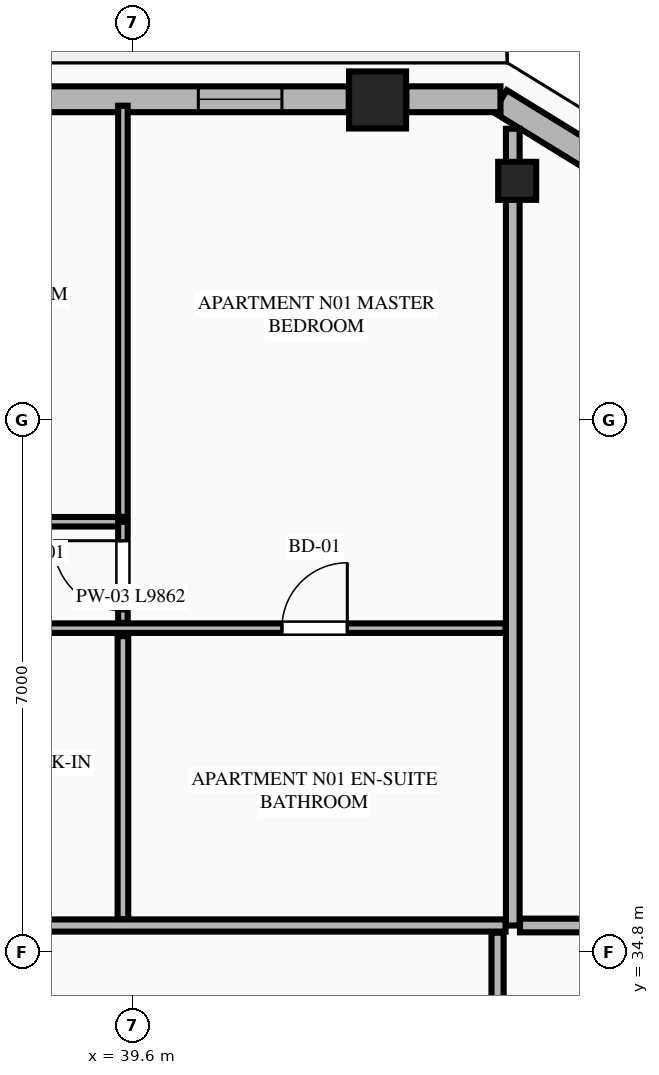
"""IFC4 building model, lengths in metres.
Left out: names, types, materials, properties, quantities, classifications, styles, units other than length and angle.
Written with IfcOpenShell. Run it as: python <this file> out.ifc"""

import sys

from ifc_helpers import new_model, si_unit, direction, frame, frame_2d, origin, origin_2d, place, context, subcontext, project, spatial, rectangle, extrude, element, fill, save


model = new_model("IFC4")
c1 = context("Model", 3, precision=1e-05, world=origin(), true_north=direction((0.0, 1.0)))
c2 = subcontext(c1, "Body", "Model", "MODEL_VIEW")
j1 = project(units=[si_unit("LENGTHUNIT", "METRE"), si_unit("PLANEANGLEUNIT", "RADIAN")], contexts=[c1])
p1 = place(None, origin())
s1 = spatial("IfcSite", under=j1, at=p1, CompositionType="ELEMENT")
p2 = place(p1, origin())
s2 = spatial("IfcBuilding", under=s1, at=p2, CompositionType="ELEMENT")
p3 = place(p2, frame((0.0, 0.0, 207.4)))
s3 = spatial("IfcBuildingStorey", under=s2, at=p3, CompositionType="ELEMENT", Elevation=207.4)
p4 = place(p3, frame((42.821, 46.011, 0.0), z_axis=(0.0, 0.0, 1.0), x_axis=(1.0, 0.0, 0.0)))
e1 = element("IfcColumn", 1, at=p4, inside=s3, PredefinedType="COLUMN", context=c2, shape_type="SweptSolid", body=[
    extrude(rectangle(XDim=0.75, YDim=0.75, at=origin_2d()), origin(), (0.0, 0.0, 1.0), 3.55),
])
p5 = place(p3, frame((44.658, 44.947, 0.0), z_axis=(0.0, 0.0, 1.0), x_axis=(-0.865230187018, 0.501374833306, 0.0)))
e2 = element("IfcColumn", 2, at=p5, inside=s3, PredefinedType="PILASTER", context=c2, shape_type="SweptSolid", body=[
    extrude(rectangle(XDim=0.5, YDim=0.35, at=origin_2d()), origin(), (0.0, 0.0, 1.0), 3.55),
])
p6 = place(p3, frame((45.862, 45.116, 0.0), z_axis=(0.0, 0.0, 1.0), x_axis=(-0.851713271379, 0.524008113828, 0.0)))
e3 = element("IfcWall", 3, at=p6, inside=s3, PredefinedType="STANDARD", context=c2, shape_type="SweptSolid", body=[
    extrude(rectangle(XDim=1.678, YDim=0.34, at=frame_2d((0.839, 0.0))), origin(), (0.0, 0.0, 1.0), 3.35),
])
p7 = place(p3, frame((44.438, 46.02, 0.0), z_axis=(0.0, 0.0, 1.0), x_axis=(-1.0, 0.0, 0.0)))
e4 = element("IfcWall", 4, at=p7, inside=s3, PredefinedType="STANDARD", context=c2, shape_type="SweptSolid", body=[
    extrude(rectangle(XDim=1.238, YDim=0.34, at=frame_2d((0.619, 0.0))), origin(), (0.0, 0.0, 1.0), 3.35),
])
p8 = place(p3, frame((42.442, 46.02, 0.0), z_axis=(0.0, 0.0, 1.0), x_axis=(-1.0, 0.0, 0.0)))
e5 = element("IfcWall", 5, at=p8, inside=s3, PredefinedType="STANDARD", context=c2, shape_type="SweptSolid", body=[
    extrude(rectangle(XDim=6.12, YDim=0.34, at=frame_2d((3.06, 0.0))), origin(), (0.0, 0.0, 1.0), 2.883),
])
p9 = place(p8, frame((0.879, 0.0, 0.75)))
e6 = element("IfcOpeningElement", 6, at=p9, cuts=e5, PredefinedType="OPENING", context=c2, shape_type="SweptSolid", body=[
    extrude(rectangle(XDim=1.1, YDim=1.983, at=frame_2d((0.55, 0.991))), frame((0.0, 0.18, 0.0), z_axis=(0.0, -1.0, 0.0), x_axis=(1.0, 0.0, 0.0)), (0.0, 0.0, 1.0), 0.36),
])
p10 = place(p8, frame((4.052, 0.0, 0.75)))
e7 = element("IfcOpeningElement", 7, at=p10, cuts=e5, PredefinedType="OPENING", context=c2, shape_type="SweptSolid", body=[
    extrude(rectangle(XDim=1.1, YDim=1.983, at=frame_2d((0.55, 0.991))), frame((0.0, 0.18, 0.0), z_axis=(0.0, -1.0, 0.0), x_axis=(1.0, 0.0, 0.0)), (0.0, 0.0, 1.0), 0.36),
])
p11 = place(p3, frame((44.6, 35.15, 0.0), z_axis=(0.0, 0.0, 1.0), x_axis=(0.0, 1.0, 0.0)))
e8 = element("IfcWall", 8, at=p11, inside=s3, PredefinedType="PARTITIONING", context=c2, shape_type="SweptSolid", body=[
    extrude(rectangle(XDim=10.482, YDim=0.18, at=frame_2d((5.241, 0.0))), origin(), (0.0, 0.0, 1.0), 3.35),
])
p12 = place(p3, frame((20.295, 35.15, 0.0), z_axis=(0.0, 0.0, 1.0), x_axis=(1.0, 0.0, 0.0)))
e9 = element("IfcWall", 9, at=p12, inside=s3, PredefinedType="PARTITIONING", context=c2, shape_type="SweptSolid", body=[
    extrude(rectangle(XDim=24.21, YDim=0.16, at=frame_2d((12.105, 0.0))), origin(), (0.0, 0.0, 1.0), 3.35),
])
p13 = place(p12, frame((0.405, 0.0, 0.0)))
e10 = element("IfcOpeningElement", 10, at=p13, cuts=e9, PredefinedType="OPENING", context=c2, shape_type="SweptSolid", body=[
    extrude(rectangle(XDim=1.35, YDim=2.35, at=frame_2d((0.675, 1.175))), frame((0.0, 0.09, 0.0), z_axis=(0.0, -1.0, 0.0), x_axis=(1.0, 0.0, 0.0)), (0.0, 0.0, 1.0), 0.18),
])
p14 = place(p3, frame((34.643, 39.062, 0.0), z_axis=(0.0, 0.0, 1.0), x_axis=(1.0, 0.0, 0.0)))
e11 = element("IfcWall", 11, at=p14, inside=s3, PredefinedType="PARTITIONING", context=c2, shape_type="SweptSolid", body=[
    extrude(rectangle(XDim=9.862, YDim=0.125, at=frame_2d((4.931, 0.0))), origin(), (0.0, 0.0, 1.0), 3.35),
])
p15 = place(p14, frame((6.92, 0.0, 0.0)))
e12 = element("IfcOpeningElement", 12, at=p15, cuts=e11, PredefinedType="OPENING", context=c2, shape_type="SweptSolid", body=[
    extrude(rectangle(XDim=0.86, YDim=2.1, at=frame_2d((0.43, 1.05))), frame((0.0, 0.073, 0.0), z_axis=(0.0, -1.0, 0.0), x_axis=(1.0, 0.0, 0.0)), (0.0, 0.0, 1.0), 0.145),
])
p16 = place(p14, frame((0.3, 0.0, 0.0)))
e13 = element("IfcOpeningElement", 13, at=p16, cuts=e11, PredefinedType="OPENING", context=c2, shape_type="SweptSolid", body=[
    extrude(rectangle(XDim=0.88, YDim=2.15, at=frame_2d((0.44, 1.075))), frame((0.0, 0.073, 0.0), z_axis=(0.0, -1.0, 0.0), x_axis=(1.0, 0.0, 0.0)), (0.0, 0.0, 1.0), 0.145),
])
p17 = place(p3, frame((29.514, 40.462, 0.0), z_axis=(0.0, 0.0, 1.0), x_axis=(1.0, 0.0, 0.0)))
e14 = element("IfcWall", 14, at=p17, inside=s3, PredefinedType="PARTITIONING", context=c2, shape_type="SweptSolid", body=[
    extrude(rectangle(XDim=9.957, YDim=0.125, at=frame_2d((4.979, 0.0))), origin(), (0.0, 0.0, 1.0), 3.35),
])
p18 = place(p17, frame((0.35, 0.0, 0.0)))
e15 = element("IfcOpeningElement", 15, at=p18, cuts=e14, PredefinedType="OPENING", context=c2, shape_type="SweptSolid", body=[
    extrude(rectangle(XDim=0.92, YDim=2.15, at=frame_2d((0.46, 1.075))), frame((0.0, 0.073, 0.0), z_axis=(0.0, -1.0, 0.0), x_axis=(1.0, 0.0, 0.0)), (0.0, 0.0, 1.0), 0.145),
])
p19 = place(p17, frame((5.479, 0.0, 0.0)))
e16 = element("IfcOpeningElement", 16, at=p19, cuts=e14, PredefinedType="OPENING", context=c2, shape_type="SweptSolid", body=[
    extrude(rectangle(XDim=0.92, YDim=2.15, at=frame_2d((0.46, 1.075))), frame((0.0, 0.073, 0.0), z_axis=(0.0, -1.0, 0.0), x_axis=(1.0, 0.0, 0.0)), (0.0, 0.0, 1.0), 0.145),
])
p20 = place(p3, frame((39.471, 39.132, 0.0), z_axis=(0.0, 0.0, 1.0), x_axis=(0.0, 1.0, 0.0)))
e17 = element("IfcWall", 17, at=p20, inside=s3, PredefinedType="PARTITIONING", context=c2, shape_type="SweptSolid", body=[
    extrude(rectangle(XDim=1.33, YDim=0.125, at=frame_2d((0.665, 0.0))), origin(), (0.0, 0.0, 1.0), 3.35),
])
p21 = place(p20, frame((0.16, 0.0, 0.0)))
e18 = element("IfcOpeningElement", 18, at=p21, cuts=e17, PredefinedType="OPENING", context=c2, shape_type="SweptSolid", body=[
    extrude(rectangle(XDim=0.92, YDim=2.15, at=frame_2d((0.46, 1.075))), frame((0.0, 0.073, 0.0), z_axis=(0.0, -1.0, 0.0), x_axis=(1.0, 0.0, 0.0)), (0.0, 0.0, 1.0), 0.145),
])
p22 = place(p3, frame((39.471, 40.527, 0.0), z_axis=(0.0, 0.0, 1.0), x_axis=(0.0, 1.0, 0.0)))
e19 = element("IfcWall", 19, at=p22, inside=s3, PredefinedType="PARTITIONING", context=c2, shape_type="SweptSolid", body=[
    extrude(rectangle(XDim=5.408, YDim=0.125, at=frame_2d((2.704, 0.0))), origin(), (0.0, 0.0, 1.0), 3.35),
])
p23 = place(p3, frame((39.471, 35.235, 0.0), z_axis=(0.0, 0.0, 1.0), x_axis=(0.0, 1.0, 0.0)))
e20 = element("IfcWall", 20, at=p23, inside=s3, PredefinedType="PLUMBINGWALL", context=c2, shape_type="SweptSolid", body=[
    extrude(rectangle(XDim=3.722, YDim=0.14, at=frame_2d((1.861, 0.0))), origin(), (0.0, 0.0, 1.0), 3.35),
])
p24 = place(p3, frame((44.695, 35.15, 0.0), z_axis=(0.0, 0.0, 1.0), x_axis=(1.0, 0.0, 0.0)))
e21 = element("IfcWall", 21, at=p24, inside=s3, PredefinedType="PARTITIONING", context=c2, shape_type="SweptSolid", body=[
    extrude(rectangle(XDim=5.995, YDim=0.18, at=frame_2d((2.998, 0.0))), origin(), (0.0, 0.0, 1.0), 3.35),
])
p25 = place(p3, frame((44.4, 16.345, 0.0), z_axis=(0.0, 0.0, 1.0), x_axis=(0.0, 1.0, 0.0)))
e22 = element("IfcWall", 22, at=p25, inside=s3, PredefinedType="PARTITIONING", context=c2, shape_type="SweptSolid", body=[
    extrude(rectangle(XDim=18.71, YDim=0.16, at=frame_2d((9.355, 0.0))), origin(), (0.0, 0.0, 1.0), 3.35),
])
p26 = place(p25, frame((0.45, 0.0, 0.0)))
e23 = element("IfcOpeningElement", 23, at=p26, cuts=e22, PredefinedType="OPENING", context=c2, shape_type="SweptSolid", body=[
    extrude(rectangle(XDim=1.02, YDim=2.25, at=frame_2d((0.51, 1.125))), frame((0.0, 0.09, 0.0), z_axis=(0.0, -1.0, 0.0), x_axis=(1.0, 0.0, 0.0)), (0.0, 0.0, 1.0), 0.18),
])
p27 = place(p9, origin())
e24 = element("IfcWindow", 24, at=p27, inside=s3, PartitioningType="SINGLE_PANEL", PredefinedType="WINDOW", context=c2, shape_type="SweptSolid", body=[
    extrude(rectangle(XDim=1.1, YDim=1.983, at=frame_2d((0.55, 0.991))), frame((0.0, 0.03, 0.0), z_axis=(0.0, -1.0, 0.0), x_axis=(1.0, 0.0, 0.0)), (0.0, 0.0, 1.0), 0.06),
])
fill(e6, e24)
p28 = place(p15, origin())
e25 = element("IfcDoor", 25, at=p28, inside=s3, OperationType="SINGLE_SWING_RIGHT", PredefinedType="DOOR", context=c2, shape_type="SweptSolid", body=[
    extrude(rectangle(XDim=0.86, YDim=2.1, at=frame_2d((0.43, 1.05))), frame((0.0, 0.025, 0.0), z_axis=(0.0, -1.0, 0.0), x_axis=(1.0, 0.0, 0.0)), (0.0, 0.0, 1.0), 0.05),
])
fill(e12, e25)
p29 = place(p21, origin())
e26 = element("IfcDoor", 26, at=p29, inside=s3, OperationType="SINGLE_SWING_RIGHT", PredefinedType="DOOR", context=c2, shape_type="SweptSolid", body=[
    extrude(rectangle(XDim=0.92, YDim=2.15, at=frame_2d((0.46, 1.075))), frame((0.0, 0.025, 0.0), z_axis=(0.0, -1.0, 0.0), x_axis=(1.0, 0.0, 0.0)), (0.0, 0.0, 1.0), 0.05),
])
fill(e18, e26)
save(model, sys.argv[1])
